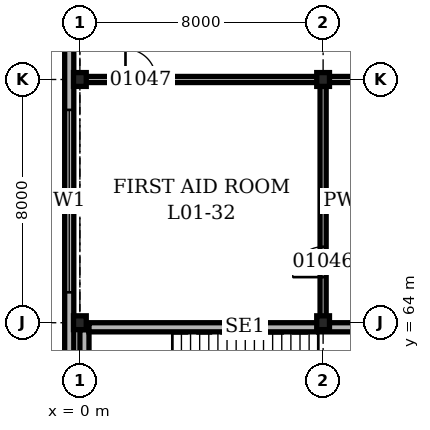
"""IFC4 building model, lengths in metres.
Left out: names, types, materials, properties, quantities, classifications, styles, units other than length and angle.
Written with IfcOpenShell. Run it as: python <this file> out.ifc"""

import sys

from ifc_helpers import new_model, si_unit, direction, frame, frame_2d, origin, origin_2d, place, context, subcontext, project, spatial, rectangle, i_section, extrude, element, fill, save


model = new_model("IFC4")
c1 = context("Model", 3, precision=1e-05, world=origin(), true_north=direction((0.0, 1.0)))
c2 = subcontext(c1, "Body", "Model", "MODEL_VIEW")
j1 = project(units=[si_unit("LENGTHUNIT", "METRE"), si_unit("PLANEANGLEUNIT", "RADIAN")], contexts=[c1])
p1 = place(None, origin())
s1 = spatial("IfcSite", under=j1, at=p1, CompositionType="ELEMENT")
p2 = place(p1, origin())
s2 = spatial("IfcBuilding", under=s1, at=p2, CompositionType="ELEMENT")
p3 = place(p2, frame((0.0, 0.0, 4.9)))
s3 = spatial("IfcBuildingStorey", under=s2, at=p3, CompositionType="ELEMENT", Elevation=4.9)
for number, where, z_axis, x_axis in (
    (1, (0.0, 64.0, 0.0), (0.0, 0.0, 1.0), (1.0, 0.0, 0.0)),
    (2, (0.0, 72.0, 0.0), (0.0, 0.0, 1.0), (1.0, 0.0, 0.0)),
    (3, (8.0, 64.0, 0.0), (0.0, 0.0, 1.0), (1.0, 0.0, 0.0)),
    (4, (8.0, 72.0, 0.0), (0.0, 0.0, 1.0), (1.0, 0.0, 0.0)),
):
    element("IfcColumn", number, at=place(p3, frame(where, z_axis=z_axis, x_axis=x_axis)), inside=s3, PredefinedType="COLUMN", context=c2, shape_type="SweptSolid", body=[
        extrude(i_section(OverallWidth=0.419, OverallDepth=0.455, WebThickness=0.042, FlangeThickness=0.068, at=origin_2d()), origin(), (0.0, 0.0, 1.0), 5.0),
    ])
p4 = place(p3, frame((-0.35, 112.35, 0.0), z_axis=(0.0, 0.0, 1.0), x_axis=(0.0, -1.0, 0.0)))
e5 = element("IfcWall", 5, at=p4, inside=s3, PredefinedType="SOLIDWALL", context=c2, shape_type="SweptSolid", body=[
    extrude(rectangle(XDim=112.7, YDim=0.3, at=frame_2d((56.35, 0.0))), origin(), (0.0, 0.0, 1.0), 5.0),
])
p5 = place(p4, frame((1.35, 0.0, 1.0)))
e6 = element("IfcOpeningElement", 6, at=p5, cuts=e5, PredefinedType="OPENING", context=c2, shape_type="SweptSolid", body=[
    extrude(rectangle(XDim=6.0, YDim=1.5, at=frame_2d((3.0, 0.75))), frame((0.0, 0.16, 0.0), z_axis=(0.0, -1.0, 0.0), x_axis=(1.0, 0.0, 0.0)), (0.0, 0.0, 1.0), 0.32),
])
p6 = place(p4, frame((9.35, 0.0, 1.0)))
e7 = element("IfcOpeningElement", 7, at=p6, cuts=e5, PredefinedType="OPENING", context=c2, shape_type="SweptSolid", body=[
    extrude(rectangle(XDim=6.0, YDim=1.5, at=frame_2d((3.0, 0.75))), frame((0.0, 0.16, 0.0), z_axis=(0.0, -1.0, 0.0), x_axis=(1.0, 0.0, 0.0)), (0.0, 0.0, 1.0), 0.32),
])
p7 = place(p4, frame((17.35, 0.0, 1.0)))
e8 = element("IfcOpeningElement", 8, at=p7, cuts=e5, PredefinedType="OPENING", context=c2, shape_type="SweptSolid", body=[
    extrude(rectangle(XDim=6.0, YDim=1.5, at=frame_2d((3.0, 0.75))), frame((0.0, 0.16, 0.0), z_axis=(0.0, -1.0, 0.0), x_axis=(1.0, 0.0, 0.0)), (0.0, 0.0, 1.0), 0.32),
])
p8 = place(p4, frame((25.35, 0.0, 1.0)))
e9 = element("IfcOpeningElement", 9, at=p8, cuts=e5, PredefinedType="OPENING", context=c2, shape_type="SweptSolid", body=[
    extrude(rectangle(XDim=6.0, YDim=1.5, at=frame_2d((3.0, 0.75))), frame((0.0, 0.16, 0.0), z_axis=(0.0, -1.0, 0.0), x_axis=(1.0, 0.0, 0.0)), (0.0, 0.0, 1.0), 0.32),
])
p9 = place(p4, frame((33.35, 0.0, 1.0)))
e10 = element("IfcOpeningElement", 10, at=p9, cuts=e5, PredefinedType="OPENING", context=c2, shape_type="SweptSolid", body=[
    extrude(rectangle(XDim=6.0, YDim=1.5, at=frame_2d((3.0, 0.75))), frame((0.0, 0.16, 0.0), z_axis=(0.0, -1.0, 0.0), x_axis=(1.0, 0.0, 0.0)), (0.0, 0.0, 1.0), 0.32),
])
p10 = place(p4, frame((41.35, 0.0, 1.0)))
e11 = element("IfcOpeningElement", 11, at=p10, cuts=e5, PredefinedType="OPENING", context=c2, shape_type="SweptSolid", body=[
    extrude(rectangle(XDim=6.0, YDim=1.5, at=frame_2d((3.0, 0.75))), frame((0.0, 0.16, 0.0), z_axis=(0.0, -1.0, 0.0), x_axis=(1.0, 0.0, 0.0)), (0.0, 0.0, 1.0), 0.32),
])
p11 = place(p4, frame((49.35, 0.0, 1.0)))
e12 = element("IfcOpeningElement", 12, at=p11, cuts=e5, PredefinedType="OPENING", context=c2, shape_type="SweptSolid", body=[
    extrude(rectangle(XDim=6.0, YDim=1.5, at=frame_2d((3.0, 0.75))), frame((0.0, 0.16, 0.0), z_axis=(0.0, -1.0, 0.0), x_axis=(1.0, 0.0, 0.0)), (0.0, 0.0, 1.0), 0.32),
])
p12 = place(p4, frame((57.35, 0.0, 1.0)))
e13 = element("IfcOpeningElement", 13, at=p12, cuts=e5, PredefinedType="OPENING", context=c2, shape_type="SweptSolid", body=[
    extrude(rectangle(XDim=6.0, YDim=1.5, at=frame_2d((3.0, 0.75))), frame((0.0, 0.16, 0.0), z_axis=(0.0, -1.0, 0.0), x_axis=(1.0, 0.0, 0.0)), (0.0, 0.0, 1.0), 0.32),
])
p13 = place(p4, frame((65.35, 0.0, 1.0)))
e14 = element("IfcOpeningElement", 14, at=p13, cuts=e5, PredefinedType="OPENING", context=c2, shape_type="SweptSolid", body=[
    extrude(rectangle(XDim=6.0, YDim=1.5, at=frame_2d((3.0, 0.75))), frame((0.0, 0.16, 0.0), z_axis=(0.0, -1.0, 0.0), x_axis=(1.0, 0.0, 0.0)), (0.0, 0.0, 1.0), 0.32),
])
p14 = place(p4, frame((73.35, 0.0, 1.0)))
e15 = element("IfcOpeningElement", 15, at=p14, cuts=e5, PredefinedType="OPENING", context=c2, shape_type="SweptSolid", body=[
    extrude(rectangle(XDim=6.0, YDim=1.5, at=frame_2d((3.0, 0.75))), frame((0.0, 0.16, 0.0), z_axis=(0.0, -1.0, 0.0), x_axis=(1.0, 0.0, 0.0)), (0.0, 0.0, 1.0), 0.32),
])
p15 = place(p4, frame((81.35, 0.0, 1.0)))
e16 = element("IfcOpeningElement", 16, at=p15, cuts=e5, PredefinedType="OPENING", context=c2, shape_type="SweptSolid", body=[
    extrude(rectangle(XDim=6.0, YDim=1.5, at=frame_2d((3.0, 0.75))), frame((0.0, 0.16, 0.0), z_axis=(0.0, -1.0, 0.0), x_axis=(1.0, 0.0, 0.0)), (0.0, 0.0, 1.0), 0.32),
])
p16 = place(p4, frame((89.35, 0.0, 1.0)))
e17 = element("IfcOpeningElement", 17, at=p16, cuts=e5, PredefinedType="OPENING", context=c2, shape_type="SweptSolid", body=[
    extrude(rectangle(XDim=6.0, YDim=1.5, at=frame_2d((3.0, 0.75))), frame((0.0, 0.16, 0.0), z_axis=(0.0, -1.0, 0.0), x_axis=(1.0, 0.0, 0.0)), (0.0, 0.0, 1.0), 0.32),
])
p17 = place(p4, frame((97.35, 0.0, 1.0)))
e18 = element("IfcOpeningElement", 18, at=p17, cuts=e5, PredefinedType="OPENING", context=c2, shape_type="SweptSolid", body=[
    extrude(rectangle(XDim=6.0, YDim=1.5, at=frame_2d((3.0, 0.75))), frame((0.0, 0.16, 0.0), z_axis=(0.0, -1.0, 0.0), x_axis=(1.0, 0.0, 0.0)), (0.0, 0.0, 1.0), 0.32),
])
p18 = place(p4, frame((105.35, 0.0, 1.0)))
e19 = element("IfcOpeningElement", 19, at=p18, cuts=e5, PredefinedType="OPENING", context=c2, shape_type="SweptSolid", body=[
    extrude(rectangle(XDim=6.0, YDim=1.5, at=frame_2d((3.0, 0.75))), frame((0.0, 0.16, 0.0), z_axis=(0.0, -1.0, 0.0), x_axis=(1.0, 0.0, 0.0)), (0.0, 0.0, 1.0), 0.32),
])
p19 = place(p3, frame((0.15, 56.227, 0.0), z_axis=(0.0, 0.0, 1.0), x_axis=(0.0, 1.0, 0.0)))
e20 = element("IfcWall", 20, at=p19, inside=s3, PredefinedType="SOLIDWALL", context=c2, shape_type="SweptSolid", body=[
    extrude(rectangle(XDim=7.545, YDim=0.3, at=frame_2d((3.773, 0.0))), origin(), (0.0, 0.0, 1.0), 4.8),
])
p20 = place(p3, frame((0.3, 63.85, 0.0), z_axis=(0.0, 0.0, 1.0), x_axis=(1.0, 0.0, 0.0)))
e21 = element("IfcWall", 21, at=p20, inside=s3, PredefinedType="SOLIDWALL", context=c2, shape_type="SweptSolid", body=[
    extrude(rectangle(XDim=10.25, YDim=0.3, at=frame_2d((5.125, 0.0))), origin(), (0.0, 0.0, 1.0), 4.8),
])
p21 = place(p3, frame((-0.15, 72.0, 0.0), z_axis=(0.0, 0.0, 1.0), x_axis=(1.0, 0.0, 0.0)))
e22 = element("IfcWall", 22, at=p21, inside=s3, PredefinedType="PARTITIONING", context=c2, shape_type="SweptSolid", body=[
    extrude(rectangle(XDim=40.05, YDim=0.2, at=frame_2d((20.025, 0.0))), origin(), (0.0, 0.0, 1.0), 4.028),
])
p22 = place(p21, frame((1.65, 0.0, 0.0)))
e23 = element("IfcOpeningElement", 23, at=p22, cuts=e22, PredefinedType="OPENING", context=c2, shape_type="SweptSolid", body=[
    extrude(rectangle(XDim=1.0, YDim=2.1, at=frame_2d((0.5, 1.05))), frame((0.0, 0.11, 0.0), z_axis=(0.0, -1.0, 0.0), x_axis=(1.0, 0.0, 0.0)), (0.0, 0.0, 1.0), 0.22),
])
p23 = place(p21, frame((25.65, 0.0, 0.0)))
e24 = element("IfcOpeningElement", 24, at=p23, cuts=e22, PredefinedType="OPENING", context=c2, shape_type="SweptSolid", body=[
    extrude(rectangle(XDim=1.0, YDim=2.1, at=frame_2d((0.5, 1.05))), frame((0.0, 0.11, 0.0), z_axis=(0.0, -1.0, 0.0), x_axis=(1.0, 0.0, 0.0)), (0.0, 0.0, 1.0), 0.22),
])
p24 = place(p21, frame((35.65, 0.0, 0.0)))
e25 = element("IfcOpeningElement", 25, at=p24, cuts=e22, PredefinedType="OPENING", context=c2, shape_type="SweptSolid", body=[
    extrude(rectangle(XDim=1.0, YDim=2.1, at=frame_2d((0.5, 1.05))), frame((0.0, 0.11, 0.0), z_axis=(0.0, -1.0, 0.0), x_axis=(1.0, 0.0, 0.0)), (0.0, 0.0, 1.0), 0.22),
])
p25 = place(p3, frame((8.0, 64.1, 0.0), z_axis=(0.0, 0.0, 1.0), x_axis=(0.0, 1.0, 0.0)))
e26 = element("IfcWall", 26, at=p25, inside=s3, PredefinedType="PARTITIONING", context=c2, shape_type="SweptSolid", body=[
    extrude(rectangle(XDim=7.8, YDim=0.2, at=frame_2d((3.9, 0.0))), origin(), (0.0, 0.0, 1.0), 4.028),
])
p26 = place(p25, frame((1.4, 0.0, 0.0)))
e27 = element("IfcOpeningElement", 27, at=p26, cuts=e26, PredefinedType="OPENING", context=c2, shape_type="SweptSolid", body=[
    extrude(rectangle(XDim=1.0, YDim=2.1, at=frame_2d((0.5, 1.05))), frame((0.0, 0.11, 0.0), z_axis=(0.0, -1.0, 0.0), x_axis=(1.0, 0.0, 0.0)), (0.0, 0.0, 1.0), 0.22),
])
p27 = place(p10, origin())
e28 = element("IfcWindow", 28, at=p27, inside=s3, PartitioningType="SINGLE_PANEL", PredefinedType="WINDOW", context=c2, shape_type="SweptSolid", body=[
    extrude(rectangle(XDim=6.0, YDim=1.5, at=frame_2d((3.0, 0.75))), frame((0.0, 0.03, 0.0), z_axis=(0.0, -1.0, 0.0), x_axis=(1.0, 0.0, 0.0)), (0.0, 0.0, 1.0), 0.06),
])
fill(e11, e28)
p28 = place(p26, origin())
e29 = element("IfcDoor", 29, at=p28, inside=s3, OperationType="SINGLE_SWING_LEFT", PredefinedType="DOOR", context=c2, shape_type="SweptSolid", body=[
    extrude(rectangle(XDim=1.0, YDim=2.1, at=frame_2d((0.5, 1.05))), frame((0.0, 0.1, 0.0), z_axis=(0.0, -1.0, 0.0), x_axis=(1.0, 0.0, 0.0)), (0.0, 0.0, 1.0), 0.199),
])
fill(e27, e29)
p29 = place(p22, origin())
e30 = element("IfcDoor", 30, at=p29, inside=s3, OperationType="SINGLE_SWING_LEFT", PredefinedType="DOOR", context=c2, shape_type="SweptSolid", body=[
    extrude(rectangle(XDim=1.0, YDim=2.1, at=frame_2d((0.5, 1.05))), frame((0.0, 0.1, 0.0), z_axis=(0.0, -1.0, 0.0), x_axis=(1.0, 0.0, 0.0)), (0.0, 0.0, 1.0), 0.199),
])
fill(e23, e30)
save(model, sys.argv[1])
